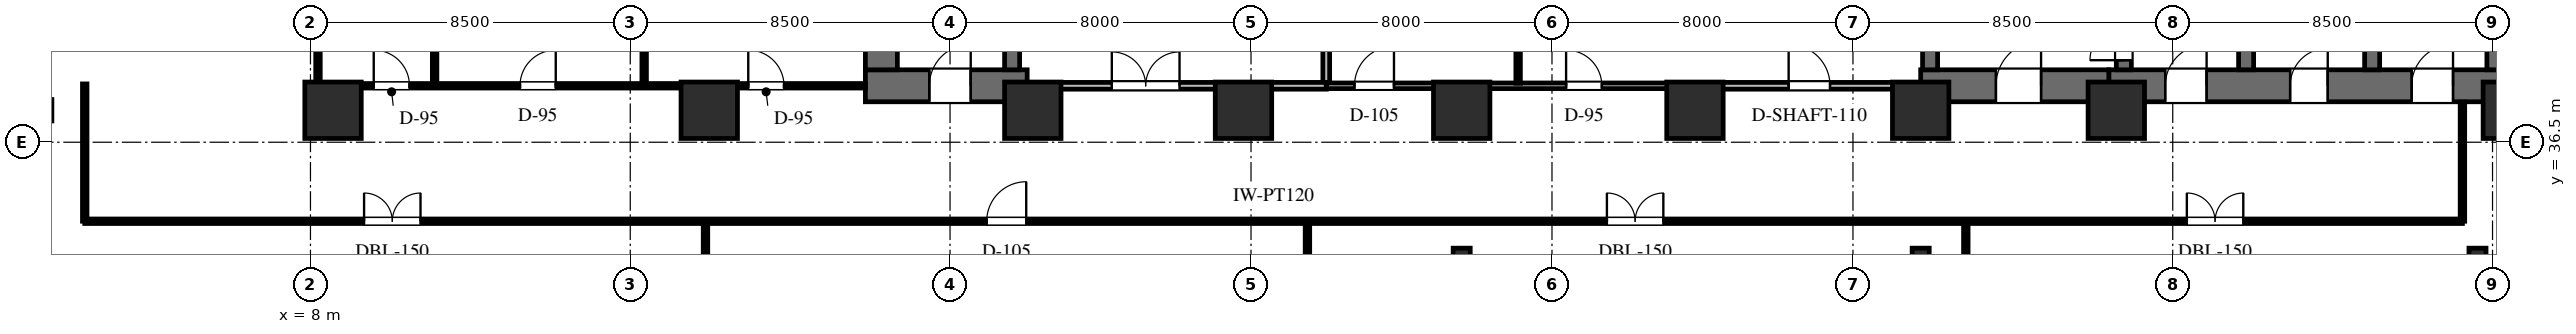
"""IFC4 building model, lengths in metres.
Left out: names, types, materials, properties, quantities, classifications, styles, units other than length and angle.
Written with IfcOpenShell. Run it as: python <this file> out.ifc"""

import sys

from ifc_helpers import new_model, si_unit, direction, frame, frame_2d, origin, origin_2d, place, context, subcontext, project, spatial, rectangle, i_section, extrude, element, fill, save


model = new_model("IFC4")
c1 = context("Model", 3, precision=1e-05, world=origin(), true_north=direction((0.0, 1.0)))
c2 = subcontext(c1, "Body", "Model", "MODEL_VIEW")
j1 = project(units=[si_unit("LENGTHUNIT", "METRE"), si_unit("PLANEANGLEUNIT", "RADIAN")], contexts=[c1])
p1 = place(None, origin())
s1 = spatial("IfcSite", under=j1, at=p1, CompositionType="ELEMENT")
p2 = place(p1, origin())
s2 = spatial("IfcBuilding", under=s1, at=p2, CompositionType="ELEMENT")
p3 = place(p2, frame((0.0, 0.0, 5.4)))
s3 = spatial("IfcBuildingStorey", under=s2, at=p3, CompositionType="ELEMENT", Elevation=5.4)
p4 = place(p3, frame((55.8, 38.0, 0.0), z_axis=(0.0, 0.0, 1.0), x_axis=(1.0, 0.0, 0.0)))
e1 = element("IfcWall", 1, at=p4, inside=s3, PredefinedType="SHEAR", context=c2, shape_type="SweptSolid", body=[
    extrude(rectangle(XDim=10.9, YDim=0.85, at=frame_2d((5.45, 0.0))), origin(), (0.0, 0.0, 1.0), 5.4),
])
p5 = place(p4, frame((1.5, 0.0, 0.0)))
e2 = element("IfcOpeningElement", 2, at=p5, cuts=e1, PredefinedType="OPENING", context=c2, shape_type="SweptSolid", body=[
    extrude(rectangle(XDim=1.1, YDim=2.2, at=frame_2d((0.55, 1.1))), frame((0.0, 0.435, 0.0), z_axis=(0.0, -1.0, 0.0), x_axis=(1.0, 0.0, 0.0)), (0.0, 0.0, 1.0), 0.87),
])
p6 = place(p4, frame((4.82, 0.0, 0.0)))
e3 = element("IfcOpeningElement", 3, at=p6, cuts=e1, PredefinedType="OPENING", context=c2, shape_type="SweptSolid", body=[
    extrude(rectangle(XDim=1.0, YDim=2.15, at=frame_2d((0.5, 1.075))), frame((0.0, 0.435, 0.0), z_axis=(0.0, -1.0, 0.0), x_axis=(1.0, 0.0, 0.0)), (0.0, 0.0, 1.0), 0.87),
])
p7 = place(p4, frame((8.05, 0.0, 0.0)))
e4 = element("IfcOpeningElement", 4, at=p7, cuts=e1, PredefinedType="OPENING", context=c2, shape_type="SweptSolid", body=[
    extrude(rectangle(XDim=1.1, YDim=2.2, at=frame_2d((0.55, 1.1))), frame((0.0, 0.435, 0.0), z_axis=(0.0, -1.0, 0.0), x_axis=(1.0, 0.0, 0.0)), (0.0, 0.0, 1.0), 0.87),
])
p8 = place(p3, frame((66.275, 38.425, 0.0), z_axis=(0.0, 0.0, 1.0), x_axis=(0.0, 1.0, 0.0)))
e5 = element("IfcWall", 5, at=p8, inside=s3, PredefinedType="SHEAR", context=c2, shape_type="SweptSolid", body=[
    extrude(rectangle(XDim=8.325, YDim=0.85, at=frame_2d((4.163, 0.0))), origin(), (0.0, 0.0, 1.0), 5.4),
])
for number, where, z_axis, x_axis in (
    (6, (62.8, 38.425, 0.0), (0.0, 0.0, 1.0), (0.0, 1.0, 0.0)),
    (7, (59.45, 38.425, 0.0), (0.0, 0.0, 1.0), (0.0, 1.0, 0.0)),
):
    element("IfcWall", number, at=place(p3, frame(where, z_axis=z_axis, x_axis=x_axis)), inside=s3, PredefinedType="SHEAR", context=c2, shape_type="SweptSolid", body=[
        extrude(rectangle(XDim=8.325, YDim=0.4, at=frame_2d((4.163, 0.0))), origin(), (0.0, 0.0, 1.0), 5.4),
    ])
p9 = place(p3, frame((56.2, 38.425, 0.0), z_axis=(0.0, 0.0, 1.0), x_axis=(0.0, 1.0, 0.0)))
e8 = element("IfcWall", 8, at=p9, inside=s3, PredefinedType="SHEAR", context=c2, shape_type="SweptSolid", body=[
    extrude(rectangle(XDim=8.325, YDim=0.4, at=frame_2d((4.163, 0.0))), origin(), (0.0, 0.0, 1.0), 5.4),
])
p10 = place(p9, frame((0.255, 0.0, 0.0)))
e9 = element("IfcOpeningElement", 9, at=p10, cuts=e8, PredefinedType="OPENING", context=c2, shape_type="SweptSolid", body=[
    extrude(rectangle(XDim=0.9, YDim=2.15, at=frame_2d((0.45, 1.075))), frame((0.0, 0.21, 0.0), z_axis=(0.0, -1.0, 0.0), x_axis=(1.0, 0.0, 0.0)), (0.0, 0.0, 1.0), 0.42),
])
p11 = place(p3, frame((50.8, 38.0, 0.0), z_axis=(0.0, 0.0, 1.0), x_axis=(1.0, 0.0, 0.0)))
e10 = element("IfcWall", 10, at=p11, inside=s3, PredefinedType="SHEAR", context=c2, shape_type="SweptSolid", body=[
    extrude(rectangle(XDim=5.0, YDim=0.85, at=frame_2d((2.5, 0.0))), origin(), (0.0, 0.0, 1.0), 5.4),
])
p12 = place(p11, frame((2.0, 0.0, 0.0)))
e11 = element("IfcOpeningElement", 11, at=p12, cuts=e10, PredefinedType="OPENING", context=c2, shape_type="SweptSolid", body=[
    extrude(rectangle(XDim=1.2, YDim=2.2, at=frame_2d((0.6, 1.1))), frame((0.0, 0.435, 0.0), z_axis=(0.0, -1.0, 0.0), x_axis=(1.0, 0.0, 0.0)), (0.0, 0.0, 1.0), 0.87),
])
p13 = place(p3, frame((51.05, 38.425, 0.0), z_axis=(0.0, 0.0, 1.0), x_axis=(0.0, 1.0, 0.0)))
e12 = element("IfcWall", 12, at=p13, inside=s3, PredefinedType="SHEAR", context=c2, shape_type="SweptSolid", body=[
    extrude(rectangle(XDim=8.325, YDim=0.4, at=frame_2d((4.163, 0.0))), origin(), (0.0, 0.0, 1.0), 5.4),
])
p14 = place(p3, frame((22.75, 38.0, 0.0), z_axis=(0.0, 0.0, 1.0), x_axis=(1.0, 0.0, 0.0)))
e13 = element("IfcWall", 13, at=p14, inside=s3, PredefinedType="SHEAR", context=c2, shape_type="SweptSolid", body=[
    extrude(rectangle(XDim=4.3, YDim=0.85, at=frame_2d((2.15, 0.0))), origin(), (0.0, 0.0, 1.0), 5.4),
])
p15 = place(p14, frame((1.7, 0.0, 0.0)))
e14 = element("IfcOpeningElement", 14, at=p15, cuts=e13, PredefinedType="OPENING", context=c2, shape_type="SweptSolid", body=[
    extrude(rectangle(XDim=1.1, YDim=2.2, at=frame_2d((0.55, 1.1))), frame((0.0, 0.435, 0.0), z_axis=(0.0, -1.0, 0.0), x_axis=(1.0, 0.0, 0.0)), (0.0, 0.0, 1.0), 0.87),
])
p16 = place(p3, frame((23.175, 38.425, 0.0), z_axis=(0.0, 0.0, 1.0), x_axis=(0.0, 1.0, 0.0)))
e15 = element("IfcWall", 15, at=p16, inside=s3, PredefinedType="SHEAR", context=c2, shape_type="SweptSolid", body=[
    extrude(rectangle(XDim=8.325, YDim=0.85, at=frame_2d((4.163, 0.0))), origin(), (0.0, 0.0, 1.0), 5.4),
])
p17 = place(p3, frame((26.65, 38.425, 0.0), z_axis=(0.0, 0.0, 1.0), x_axis=(0.0, 1.0, 0.0)))
e16 = element("IfcWall", 16, at=p17, inside=s3, PredefinedType="SHEAR", context=c2, shape_type="SweptSolid", body=[
    extrude(rectangle(XDim=8.325, YDim=0.4, at=frame_2d((4.163, 0.0))), origin(), (0.0, 0.0, 1.0), 5.4),
])
for number, where, z_axis, x_axis in (
    (17, (0.9, 37.35, 0.0), (0.0, 0.0, 1.0), (1.0, 0.0, 0.0)),
    (18, (38.6, 33.4, 0.0), (0.0, 0.0, 1.0), (1.0, 0.0, 0.0)),
    (19, (50.8, 33.4, 0.0), (0.0, 0.0, 1.0), (1.0, 0.0, 0.0)),
    (20, (65.6, 33.4, 0.0), (0.0, 0.0, 1.0), (1.0, 0.0, 0.0)),
):
    element("IfcColumn", number, at=place(p3, frame(where, z_axis=z_axis, x_axis=x_axis)), inside=s3, PredefinedType="COLUMN", context=c2, shape_type="SweptSolid", body=[
        extrude(i_section(OverallWidth=0.454, OverallDepth=0.569, WebThickness=0.078, FlangeThickness=0.125, FilletRadius=0.03, at=origin_2d()), origin(), (0.0, 0.0, 1.0), 5.4),
    ])
for number, where, z_axis, x_axis in (
    (21, (66.5, 37.35, 0.0), (0.0, 0.0, 1.0), (1.0, 0.0, 0.0)),
    (22, (56.0, 37.35, 0.0), (0.0, 0.0, 1.0), (1.0, 0.0, 0.0)),
    (23, (50.8, 37.35, 0.0), (0.0, 0.0, 1.0), (1.0, 0.0, 0.0)),
    (24, (44.8, 37.35, 0.0), (0.0, 0.0, 1.0), (1.0, 0.0, 0.0)),
    (25, (38.6, 37.35, 0.0), (0.0, 0.0, 1.0), (1.0, 0.0, 0.0)),
    (26, (32.8, 37.35, 0.0), (0.0, 0.0, 1.0), (1.0, 0.0, 0.0)),
    (27, (27.2, 37.35, 0.0), (0.0, 0.0, 1.0), (1.0, 0.0, 0.0)),
    (28, (18.6, 37.35, 0.0), (0.0, 0.0, 1.0), (1.0, 0.0, 0.0)),
    (29, (8.6, 37.35, 0.0), (0.0, 0.0, 1.0), (1.0, 0.0, 0.0)),
):
    element("IfcColumn", number, at=place(p3, frame(where, z_axis=z_axis, x_axis=x_axis)), inside=s3, PredefinedType="COLUMN", context=c2, shape_type="SweptSolid", body=[
        extrude(rectangle(XDim=1.5, YDim=1.5, at=origin_2d()), origin(), (0.0, 0.0, 1.0), 5.4),
    ])
p18 = place(p3, frame((45.05, 38.0, 0.0), z_axis=(0.0, 0.0, 1.0), x_axis=(1.0, 0.0, 0.0)))
e30 = element("IfcWall", 30, at=p18, inside=s3, PredefinedType="STANDARD", context=c2, shape_type="SweptSolid", body=[
    extrude(rectangle(XDim=5.75, YDim=0.18, at=frame_2d((2.875, 0.0))), origin(), (0.0, 0.0, 1.0), 4.182),
])
p19 = place(p18, frame((2.24, 0.0, 0.0)))
e31 = element("IfcOpeningElement", 31, at=p19, cuts=e30, PredefinedType="OPENING", context=c2, shape_type="SweptSolid", body=[
    extrude(rectangle(XDim=1.1, YDim=2.2, at=frame_2d((0.55, 1.1))), frame((0.0, 0.1, 0.0), z_axis=(0.0, -1.0, 0.0), x_axis=(1.0, 0.0, 0.0)), (0.0, 0.0, 1.0), 0.2),
])
p20 = place(p3, frame((35.0, 38.0, 0.0), z_axis=(0.0, 0.0, 1.0), x_axis=(0.0, 1.0, 0.0)))
e32 = element("IfcWall", 32, at=p20, inside=s3, PredefinedType="STANDARD", context=c2, shape_type="SweptSolid", body=[
    extrude(rectangle(XDim=5.85, YDim=0.18, at=frame_2d((2.925, 0.0))), origin(), (0.0, 0.0, 1.0), 5.13),
])
p21 = place(p3, frame((27.05, 38.0, 0.0), z_axis=(0.0, 0.0, 1.0), x_axis=(1.0, 0.0, 0.0)))
e33 = element("IfcWall", 33, at=p21, inside=s3, PredefinedType="STANDARD", context=c2, shape_type="SweptSolid", body=[
    extrude(rectangle(XDim=7.95, YDim=0.18, at=frame_2d((3.975, 0.0))), origin(), (0.0, 0.0, 1.0), 4.182),
])
p22 = place(p21, frame((2.25, 0.0, 0.0)))
e34 = element("IfcOpeningElement", 34, at=p22, cuts=e33, PredefinedType="OPENING", context=c2, shape_type="SweptSolid", body=[
    extrude(rectangle(XDim=1.8, YDim=2.2, at=frame_2d((0.9, 1.1))), frame((0.0, 0.1, 0.0), z_axis=(0.0, -1.0, 0.0), x_axis=(1.0, 0.0, 0.0)), (0.0, 0.0, 1.0), 0.2),
])
p23 = place(p3, frame((35.0, 38.0, 0.0), z_axis=(0.0, 0.0, 1.0), x_axis=(1.0, 0.0, 0.0)))
e35 = element("IfcWall", 35, at=p23, inside=s3, PredefinedType="PARTITIONING", context=c2, shape_type="SweptSolid", body=[
    extrude(rectangle(XDim=10.05, YDim=0.15, at=frame_2d((5.025, 0.0))), origin(), (0.0, 0.0, 1.0), 4.182),
])
p24 = place(p23, frame((0.75, 0.0, 0.0)))
e36 = element("IfcOpeningElement", 36, at=p24, cuts=e35, PredefinedType="OPENING", context=c2, shape_type="SweptSolid", body=[
    extrude(rectangle(XDim=1.05, YDim=2.2, at=frame_2d((0.525, 1.1))), frame((0.0, 0.085, 0.0), z_axis=(0.0, -1.0, 0.0), x_axis=(1.0, 0.0, 0.0)), (0.0, 0.0, 1.0), 0.17),
])
p25 = place(p23, frame((6.375, 0.0, 0.0)))
e37 = element("IfcOpeningElement", 37, at=p25, cuts=e35, PredefinedType="OPENING", context=c2, shape_type="SweptSolid", body=[
    extrude(rectangle(XDim=0.95, YDim=2.15, at=frame_2d((0.475, 1.075))), frame((0.0, 0.085, 0.0), z_axis=(0.0, -1.0, 0.0), x_axis=(1.0, 0.0, 0.0)), (0.0, 0.0, 1.0), 0.17),
])
p26 = place(p3, frame((40.1, 38.068, 0.0), z_axis=(0.0, 0.0, 1.0), x_axis=(0.0, 1.0, 0.0)))
e38 = element("IfcWall", 38, at=p26, inside=s3, PredefinedType="PARTITIONING", context=c2, shape_type="SweptSolid", body=[
    extrude(rectangle(XDim=5.774, YDim=0.12, at=frame_2d((2.887, 0.0))), origin(), (0.0, 0.0, 1.0), 5.13),
])
p27 = place(p3, frame((2.0, 34.4, 0.0), z_axis=(0.0, 0.0, 1.0), x_axis=(1.0, 0.0, 0.0)))
e39 = element("IfcWall", 39, at=p27, inside=s3, PredefinedType="PARTITIONING", context=c2, shape_type="SweptSolid", body=[
    extrude(rectangle(XDim=63.2, YDim=0.12, at=frame_2d((31.6, 0.0))), origin(), (0.0, 0.0, 1.0), 4.182),
])
p28 = place(p27, frame((7.425, 0.0, 0.0)))
e40 = element("IfcOpeningElement", 40, at=p28, cuts=e39, PredefinedType="OPENING", context=c2, shape_type="SweptSolid", body=[
    extrude(rectangle(XDim=1.5, YDim=2.2, at=frame_2d((0.75, 1.1))), frame((0.0, 0.07, 0.0), z_axis=(0.0, -1.0, 0.0), x_axis=(1.0, 0.0, 0.0)), (0.0, 0.0, 1.0), 0.14),
])
p29 = place(p27, frame((23.975, 0.0, 0.0)))
e41 = element("IfcOpeningElement", 41, at=p29, cuts=e39, PredefinedType="OPENING", context=c2, shape_type="SweptSolid", body=[
    extrude(rectangle(XDim=1.05, YDim=2.2, at=frame_2d((0.525, 1.1))), frame((0.0, 0.07, 0.0), z_axis=(0.0, -1.0, 0.0), x_axis=(1.0, 0.0, 0.0)), (0.0, 0.0, 1.0), 0.14),
])
p30 = place(p27, frame((40.46, 0.0, 0.0)))
e42 = element("IfcOpeningElement", 42, at=p30, cuts=e39, PredefinedType="OPENING", context=c2, shape_type="SweptSolid", body=[
    extrude(rectangle(XDim=1.5, YDim=2.2, at=frame_2d((0.75, 1.1))), frame((0.0, 0.07, 0.0), z_axis=(0.0, -1.0, 0.0), x_axis=(1.0, 0.0, 0.0)), (0.0, 0.0, 1.0), 0.14),
])
p31 = place(p27, frame((55.875, 0.0, 0.0)))
e43 = element("IfcOpeningElement", 43, at=p31, cuts=e39, PredefinedType="OPENING", context=c2, shape_type="SweptSolid", body=[
    extrude(rectangle(XDim=1.5, YDim=2.2, at=frame_2d((0.75, 1.1))), frame((0.0, 0.07, 0.0), z_axis=(0.0, -1.0, 0.0), x_axis=(1.0, 0.0, 0.0)), (0.0, 0.0, 1.0), 0.14),
])
p32 = place(p3, frame((2.0, 34.4, 0.0), z_axis=(0.0, 0.0, 1.0), x_axis=(0.0, 1.0, 0.0)))
e44 = element("IfcWall", 44, at=p32, inside=s3, PredefinedType="PARTITIONING", context=c2, shape_type="SweptSolid", body=[
    extrude(rectangle(XDim=3.65, YDim=0.12, at=frame_2d((1.825, 0.0))), origin(), (0.0, 0.0, 1.0), 4.182),
])
p33 = place(p3, frame((65.2, 34.4, 0.0), z_axis=(0.0, 0.0, 1.0), x_axis=(0.0, 1.0, 0.0)))
e45 = element("IfcWall", 45, at=p33, inside=s3, PredefinedType="PARTITIONING", context=c2, shape_type="SweptSolid", body=[
    extrude(rectangle(XDim=3.167, YDim=0.12, at=frame_2d((1.583, 0.0))), origin(), (0.0, 0.0, 1.0), 4.182),
])
p34 = place(p3, frame((8.2, 38.0, 0.0), z_axis=(0.0, 0.0, 1.0), x_axis=(1.0, 0.0, 0.0)))
e46 = element("IfcWall", 46, at=p34, inside=s3, PredefinedType="PARTITIONING", context=c2, shape_type="SweptSolid", body=[
    extrude(rectangle(XDim=14.55, YDim=0.12, at=frame_2d((7.275, 0.0))), origin(), (0.0, 0.0, 1.0), 4.182),
])
p35 = place(p34, frame((1.482, 0.0, 0.0)))
e47 = element("IfcOpeningElement", 47, at=p35, cuts=e46, PredefinedType="OPENING", context=c2, shape_type="SweptSolid", body=[
    extrude(rectangle(XDim=0.95, YDim=2.15, at=frame_2d((0.475, 1.075))), frame((0.0, 0.07, 0.0), z_axis=(0.0, -1.0, 0.0), x_axis=(1.0, 0.0, 0.0)), (0.0, 0.0, 1.0), 0.14),
])
p36 = place(p34, frame((5.37, 0.0, 0.0)))
e48 = element("IfcOpeningElement", 48, at=p36, cuts=e46, PredefinedType="OPENING", context=c2, shape_type="SweptSolid", body=[
    extrude(rectangle(XDim=0.95, YDim=2.15, at=frame_2d((0.475, 1.075))), frame((0.0, 0.07, 0.0), z_axis=(0.0, -1.0, 0.0), x_axis=(1.0, 0.0, 0.0)), (0.0, 0.0, 1.0), 0.14),
])
p37 = place(p34, frame((11.437, 0.0, 0.0)))
e49 = element("IfcOpeningElement", 49, at=p37, cuts=e46, PredefinedType="OPENING", context=c2, shape_type="SweptSolid", body=[
    extrude(rectangle(XDim=0.95, YDim=2.15, at=frame_2d((0.475, 1.075))), frame((0.0, 0.07, 0.0), z_axis=(0.0, -1.0, 0.0), x_axis=(1.0, 0.0, 0.0)), (0.0, 0.0, 1.0), 0.14),
])
p38 = place(p3, frame((8.2, 38.0, 0.0), z_axis=(0.0, 0.0, 1.0), x_axis=(0.0, 1.0, 0.0)))
e50 = element("IfcWall", 50, at=p38, inside=s3, PredefinedType="PARTITIONING", context=c2, shape_type="SweptSolid", body=[
    extrude(rectangle(XDim=11.2, YDim=0.12, at=frame_2d((5.6, 0.0))), origin(), (0.0, 0.0, 1.0), 5.13),
])
for number, where, z_axis, x_axis in (
    (51, (11.3, 38.068, 0.0), (0.0, 0.0, 1.0), (0.0, 1.0, 0.0)),
    (52, (16.87, 38.068, 0.0), (0.0, 0.0, 1.0), (0.0, 1.0, 0.0)),
):
    element("IfcWall", number, at=place(p3, frame(where, z_axis=z_axis, x_axis=x_axis)), inside=s3, PredefinedType="PARTITIONING", context=c2, shape_type="SweptSolid", body=[
        extrude(rectangle(XDim=11.064, YDim=0.12, at=frame_2d((5.532, 0.0))), origin(), (0.0, 0.0, 1.0), 4.182),
    ])
for number, where, z_axis, x_axis in (
    (53, (18.5, 0.2, 0.0), (0.0, 0.0, 1.0), (0.0, 1.0, 0.0)),
    (54, (34.5, 0.2, 0.0), (0.0, 0.0, 1.0), (0.0, 1.0, 0.0)),
    (55, (52.0, 0.2, 0.0), (0.0, 0.0, 1.0), (0.0, 1.0, 0.0)),
):
    element("IfcWall", number, at=place(p3, frame(where, z_axis=z_axis, x_axis=x_axis)), inside=s3, PredefinedType="PARTITIONING", context=c2, shape_type="SweptSolid", body=[
        extrude(rectangle(XDim=34.132, YDim=0.12, at=frame_2d((17.066, 0.0))), origin(), (0.0, 0.0, 1.0), 4.182),
    ])
p39 = place(p5, origin())
e56 = element("IfcDoor", 56, at=p39, inside=s3, OperationType="SINGLE_SWING_RIGHT", PredefinedType="DOOR", context=c2, shape_type="SweptSolid", body=[
    extrude(rectangle(XDim=1.1, YDim=2.2, at=frame_2d((0.55, 1.1))), frame((0.0, 0.025, 0.0), z_axis=(0.0, -1.0, 0.0), x_axis=(1.0, 0.0, 0.0)), (0.0, 0.0, 1.0), 0.05),
])
fill(e2, e56)
p40 = place(p6, origin())
e57 = element("IfcDoor", 57, at=p40, inside=s3, OperationType="SINGLE_SWING_RIGHT", PredefinedType="DOOR", context=c2, shape_type="SweptSolid", body=[
    extrude(rectangle(XDim=1.0, YDim=2.15, at=frame_2d((0.5, 1.075))), frame((0.0, 0.025, 0.0), z_axis=(0.0, -1.0, 0.0), x_axis=(1.0, 0.0, 0.0)), (0.0, 0.0, 1.0), 0.05),
])
fill(e3, e57)
p41 = place(p7, origin())
e58 = element("IfcDoor", 58, at=p41, inside=s3, OperationType="SINGLE_SWING_RIGHT", PredefinedType="DOOR", context=c2, shape_type="SweptSolid", body=[
    extrude(rectangle(XDim=1.1, YDim=2.2, at=frame_2d((0.55, 1.1))), frame((0.0, 0.025, 0.0), z_axis=(0.0, -1.0, 0.0), x_axis=(1.0, 0.0, 0.0)), (0.0, 0.0, 1.0), 0.05),
])
fill(e4, e58)
p42 = place(p12, origin())
e59 = element("IfcDoor", 59, at=p42, inside=s3, OperationType="SINGLE_SWING_RIGHT", PredefinedType="DOOR", context=c2, shape_type="SweptSolid", body=[
    extrude(rectangle(XDim=1.2, YDim=2.2, at=frame_2d((0.6, 1.1))), frame((0.0, 0.025, 0.0), z_axis=(0.0, -1.0, 0.0), x_axis=(1.0, 0.0, 0.0)), (0.0, 0.0, 1.0), 0.05),
])
fill(e11, e59)
p43 = place(p10, origin())
e60 = element("IfcDoor", 60, at=p43, inside=s3, OperationType="SINGLE_SWING_LEFT", PredefinedType="DOOR", context=c2, shape_type="SweptSolid", body=[
    extrude(rectangle(XDim=0.9, YDim=2.15, at=frame_2d((0.45, 1.075))), frame((0.0, 0.025, 0.0), z_axis=(0.0, -1.0, 0.0), x_axis=(1.0, 0.0, 0.0)), (0.0, 0.0, 1.0), 0.05),
])
fill(e9, e60)
p44 = place(p15, origin())
e61 = element("IfcDoor", 61, at=p44, inside=s3, OperationType="SINGLE_SWING_RIGHT", PredefinedType="DOOR", context=c2, shape_type="SweptSolid", body=[
    extrude(rectangle(XDim=1.1, YDim=2.2, at=frame_2d((0.55, 1.1))), frame((0.0, 0.025, 0.0), z_axis=(0.0, -1.0, 0.0), x_axis=(1.0, 0.0, 0.0)), (0.0, 0.0, 1.0), 0.05),
])
fill(e14, e61)
p45 = place(p19, origin())
e62 = element("IfcDoor", 62, at=p45, inside=s3, OperationType="SINGLE_SWING_LEFT", PredefinedType="DOOR", context=c2, shape_type="SweptSolid", body=[
    extrude(rectangle(XDim=1.1, YDim=2.2, at=frame_2d((0.55, 1.1))), frame((0.0, 0.025, 0.0), z_axis=(0.0, -1.0, 0.0), x_axis=(1.0, 0.0, 0.0)), (0.0, 0.0, 1.0), 0.05),
])
fill(e31, e62)
p46 = place(p22, origin())
e63 = element("IfcDoor", 63, at=p46, inside=s3, OperationType="DOUBLE_DOOR_SINGLE_SWING", PredefinedType="DOOR", context=c2, shape_type="SweptSolid", body=[
    extrude(rectangle(XDim=1.8, YDim=2.2, at=frame_2d((0.9, 1.1))), frame((0.0, 0.025, 0.0), z_axis=(0.0, -1.0, 0.0), x_axis=(1.0, 0.0, 0.0)), (0.0, 0.0, 1.0), 0.05),
])
fill(e34, e63)
p47 = place(p24, origin())
e64 = element("IfcDoor", 64, at=p47, inside=s3, OperationType="SINGLE_SWING_RIGHT", PredefinedType="DOOR", context=c2, shape_type="SweptSolid", body=[
    extrude(rectangle(XDim=1.05, YDim=2.2, at=frame_2d((0.525, 1.1))), frame((0.0, 0.025, 0.0), z_axis=(0.0, -1.0, 0.0), x_axis=(1.0, 0.0, 0.0)), (0.0, 0.0, 1.0), 0.05),
])
fill(e36, e64)
p48 = place(p25, origin())
e65 = element("IfcDoor", 65, at=p48, inside=s3, OperationType="SINGLE_SWING_LEFT", PredefinedType="DOOR", context=c2, shape_type="SweptSolid", body=[
    extrude(rectangle(XDim=0.95, YDim=2.15, at=frame_2d((0.475, 1.075))), frame((0.0, 0.025, 0.0), z_axis=(0.0, -1.0, 0.0), x_axis=(1.0, 0.0, 0.0)), (0.0, 0.0, 1.0), 0.05),
])
fill(e37, e65)
p49 = place(p35, origin())
e66 = element("IfcDoor", 66, at=p49, inside=s3, OperationType="SINGLE_SWING_LEFT", PredefinedType="DOOR", context=c2, shape_type="SweptSolid", body=[
    extrude(rectangle(XDim=0.95, YDim=2.15, at=frame_2d((0.475, 1.075))), frame((0.0, 0.025, 0.0), z_axis=(0.0, -1.0, 0.0), x_axis=(1.0, 0.0, 0.0)), (0.0, 0.0, 1.0), 0.05),
])
fill(e47, e66)
p50 = place(p36, origin())
e67 = element("IfcDoor", 67, at=p50, inside=s3, OperationType="SINGLE_SWING_RIGHT", PredefinedType="DOOR", context=c2, shape_type="SweptSolid", body=[
    extrude(rectangle(XDim=0.95, YDim=2.15, at=frame_2d((0.475, 1.075))), frame((0.0, 0.025, 0.0), z_axis=(0.0, -1.0, 0.0), x_axis=(1.0, 0.0, 0.0)), (0.0, 0.0, 1.0), 0.05),
])
fill(e48, e67)
p51 = place(p37, origin())
e68 = element("IfcDoor", 68, at=p51, inside=s3, OperationType="SINGLE_SWING_LEFT", PredefinedType="DOOR", context=c2, shape_type="SweptSolid", body=[
    extrude(rectangle(XDim=0.95, YDim=2.15, at=frame_2d((0.475, 1.075))), frame((0.0, 0.025, 0.0), z_axis=(0.0, -1.0, 0.0), x_axis=(1.0, 0.0, 0.0)), (0.0, 0.0, 1.0), 0.05),
])
fill(e49, e68)
p52 = place(p28, origin())
e69 = element("IfcDoor", 69, at=p52, inside=s3, OperationType="DOUBLE_DOOR_SINGLE_SWING", PredefinedType="DOOR", context=c2, shape_type="SweptSolid", body=[
    extrude(rectangle(XDim=1.5, YDim=2.2, at=frame_2d((0.75, 1.1))), frame((0.0, 0.025, 0.0), z_axis=(0.0, -1.0, 0.0), x_axis=(1.0, 0.0, 0.0)), (0.0, 0.0, 1.0), 0.05),
])
fill(e40, e69)
p53 = place(p29, origin())
e70 = element("IfcDoor", 70, at=p53, inside=s3, OperationType="SINGLE_SWING_RIGHT", PredefinedType="DOOR", context=c2, shape_type="SweptSolid", body=[
    extrude(rectangle(XDim=1.05, YDim=2.2, at=frame_2d((0.525, 1.1))), frame((0.0, 0.025, 0.0), z_axis=(0.0, -1.0, 0.0), x_axis=(1.0, 0.0, 0.0)), (0.0, 0.0, 1.0), 0.05),
])
fill(e41, e70)
p54 = place(p30, origin())
e71 = element("IfcDoor", 71, at=p54, inside=s3, OperationType="DOUBLE_DOOR_SINGLE_SWING", PredefinedType="DOOR", context=c2, shape_type="SweptSolid", body=[
    extrude(rectangle(XDim=1.5, YDim=2.2, at=frame_2d((0.75, 1.1))), frame((0.0, 0.025, 0.0), z_axis=(0.0, -1.0, 0.0), x_axis=(1.0, 0.0, 0.0)), (0.0, 0.0, 1.0), 0.05),
])
fill(e42, e71)
p55 = place(p31, origin())
e72 = element("IfcDoor", 72, at=p55, inside=s3, OperationType="DOUBLE_DOOR_SINGLE_SWING", PredefinedType="DOOR", context=c2, shape_type="SweptSolid", body=[
    extrude(rectangle(XDim=1.5, YDim=2.2, at=frame_2d((0.75, 1.1))), frame((0.0, 0.025, 0.0), z_axis=(0.0, -1.0, 0.0), x_axis=(1.0, 0.0, 0.0)), (0.0, 0.0, 1.0), 0.05),
])
fill(e43, e72)
save(model, sys.argv[1])
